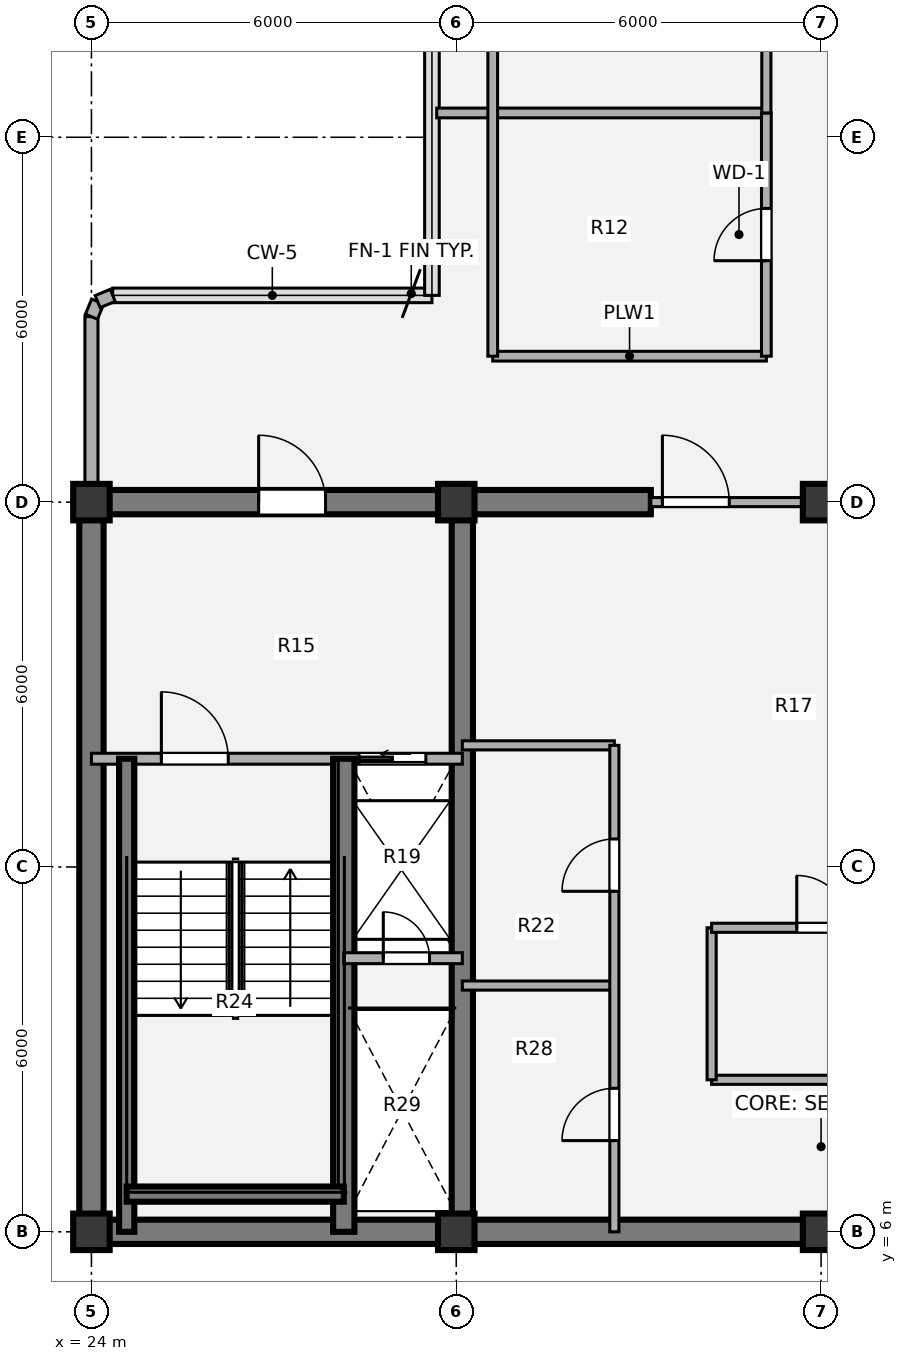
"""IFC4 building model, lengths in metres.
Left out: names, types, materials, properties, quantities, classifications, styles, units other than length and angle.
Written with IfcOpenShell. Run it as: python <this file> out.ifc"""

import sys

from ifc_helpers import new_model, si_unit, direction, frame, frame_2d, origin, origin_2d, place, context, subcontext, project, spatial, rectangle, extrude, source, transform, mapped, element, fill, save


model = new_model("IFC4")
c1 = context("Model", 3, precision=1e-05, world=origin(), true_north=direction((0.0, 1.0)))
c2 = subcontext(c1, "Body", "Model", "MODEL_VIEW")
j1 = project(units=[si_unit("LENGTHUNIT", "METRE"), si_unit("PLANEANGLEUNIT", "RADIAN")], contexts=[c1])
p1 = place(None, origin())
s1 = spatial("IfcSite", under=j1, at=p1, CompositionType="ELEMENT")
p2 = place(p1, origin())
s2 = spatial("IfcBuilding", under=s1, at=p2, CompositionType="ELEMENT")
p3 = place(p2, frame((0.0, 0.0, 283.5)))
s3 = spatial("IfcBuildingStorey", under=s2, at=p3, CompositionType="ELEMENT", Elevation=283.5)
m1 = source(origin(), c2, "Body", "SweptSolid", [
    extrude(rectangle(XDim=0.6, YDim=0.6, at=origin_2d()), origin(), (0.0, 0.0, 1.0), 3.78),
])
for number, where, z_axis, x_axis in (
    (1, (24.0, 6.0, 0.0), (0.0, 0.0, 1.0), (1.0, 0.0, 0.0)),
    (2, (30.0, 6.0, 0.0), (0.0, 0.0, 1.0), (1.0, 0.0, 0.0)),
    (3, (36.0, 6.0, 0.0), (0.0, 0.0, 1.0), (1.0, 0.0, 0.0)),
    (4, (24.0, 18.0, 0.0), (0.0, 0.0, 1.0), (1.0, 0.0, 0.0)),
    (5, (30.0, 18.0, 0.0), (0.0, 0.0, 1.0), (1.0, 0.0, 0.0)),
    (6, (36.0, 18.0, 0.0), (0.0, 0.0, 1.0), (1.0, 0.0, 0.0)),
):
    element("IfcColumn", number, at=place(p3, frame(where, z_axis=z_axis, x_axis=x_axis)), inside=s3, PredefinedType="COLUMN", context=c2, shape_type="MappedRepresentation", body=[
        mapped(m1, transform((0.0, 0.0, 0.0), x_axis=(1.0, 0.0, 0.0), y_axis=(0.0, 1.0, 0.0), z_axis=(0.0, 0.0, 1.0), scale=1.0)),
    ])
p4 = place(p3, frame((48.2, 6.0, 0.0), z_axis=(0.0, 0.0, 1.0), x_axis=(-1.0, 0.0, 0.0)))
e7 = element("IfcWall", 7, at=p4, inside=s3, PredefinedType="SHEAR", context=c2, shape_type="SweptSolid", body=[
    extrude(rectangle(XDim=24.4, YDim=0.4, at=frame_2d((12.2, 0.0))), origin(), (0.0, 0.0, 1.0), 3.78),
])
p5 = place(p3, frame((24.0, 6.0, 0.0), z_axis=(0.0, 0.0, 1.0), x_axis=(0.0, 1.0, 0.0)))
e8 = element("IfcWall", 8, at=p5, inside=s3, PredefinedType="SHEAR", context=c2, shape_type="SweptSolid", body=[
    extrude(rectangle(XDim=12.0, YDim=0.4, at=frame_2d((6.0, 0.0))), origin(), (0.0, 0.0, 1.0), 3.78),
])
p6 = place(p3, frame((23.8, 18.0, 0.0), z_axis=(0.0, 0.0, 1.0), x_axis=(1.0, 0.0, 0.0)))
e9 = element("IfcWall", 9, at=p6, inside=s3, PredefinedType="SHEAR", context=c2, shape_type="SweptSolid", body=[
    extrude(rectangle(XDim=9.4, YDim=0.4, at=frame_2d((4.7, 0.0))), origin(), (0.0, 0.0, 1.0), 3.78),
])
p7 = place(p6, frame((2.95, 0.0, 0.0)))
e10 = element("IfcOpeningElement", 10, at=p7, cuts=e9, PredefinedType="OPENING", context=c2, shape_type="SweptSolid", body=[
    extrude(rectangle(XDim=1.1, YDim=2.1, at=origin_2d()), frame((0.55, 0.21, 1.05), z_axis=(0.0, -1.0, 0.0), x_axis=(1.0, 0.0, 0.0)), (0.0, 0.0, 1.0), 0.42),
])
p8 = place(p3, frame((30.1, 6.0, 0.0), z_axis=(0.0, 0.0, 1.0), x_axis=(0.0, 1.0, 0.0)))
e11 = element("IfcWall", 11, at=p8, inside=s3, PredefinedType="SHEAR", context=c2, shape_type="SweptSolid", body=[
    extrude(rectangle(XDim=12.0, YDim=0.35, at=frame_2d((6.0, 0.0))), origin(), (0.0, 0.0, 1.0), 3.78),
])
p9 = place(p3, frame((24.0, 18.28, 0.0), z_axis=(0.0, 0.0, 1.0), x_axis=(0.0, 1.0, 0.0)))
e12 = element("IfcWall", 12, at=p9, inside=s3, PredefinedType="SOLIDWALL", context=c2, shape_type="SweptSolid", body=[
    extrude(rectangle(XDim=2.77, YDim=0.215, at=frame_2d((1.385, 0.0))), origin(), (0.0, 0.0, 1.0), 2.718),
])
p10 = place(p3, frame((24.0, 21.05, 0.0), z_axis=(0.0, 0.0, 1.0), x_axis=(0.382673670509, 0.923883575944, 0.0)))
e13 = element("IfcWall", 13, at=p10, inside=s3, PredefinedType="SOLIDWALL", context=c2, shape_type="SweptSolid", body=[
    extrude(rectangle(XDim=0.268, YDim=0.215, at=frame_2d((0.134, 0.0))), origin(), (0.0, 0.0, 1.0), 3.53),
])
p11 = place(p3, frame((24.103, 21.298, 0.0), z_axis=(0.0, 0.0, 1.0), x_axis=(0.924205486139, 0.381895560841, 0.0)))
e14 = element("IfcWall", 14, at=p11, inside=s3, PredefinedType="SOLIDWALL", context=c2, shape_type="SweptSolid", body=[
    extrude(rectangle(XDim=0.268, YDim=0.215, at=frame_2d((0.134, 0.0))), origin(), (0.0, 0.0, 1.0), 3.53),
])
p12 = place(p3, frame((30.1, 14.0, 0.0), z_axis=(0.0, 0.0, 1.0), x_axis=(1.0, 0.0, 0.0)))
e15 = element("IfcWall", 15, at=p12, inside=s3, PredefinedType="PARTITIONING", context=c2, shape_type="SweptSolid", body=[
    extrude(rectangle(XDim=2.5, YDim=0.15, at=frame_2d((1.25, 0.0))), origin(), (0.0, 0.0, 1.0), 3.5),
])
p13 = place(p3, frame((34.2, 8.5, 0.0), z_axis=(0.0, 0.0, 1.0), x_axis=(1.0, 0.0, 0.0)))
e16 = element("IfcWall", 16, at=p13, inside=s3, PredefinedType="PARTITIONING", context=c2, shape_type="SweptSolid", body=[
    extrude(rectangle(XDim=3.8, YDim=0.15, at=frame_2d((1.9, 0.0))), origin(), (0.0, 0.0, 1.0), 3.5),
])
p14 = place(p3, frame((34.2, 8.5, 0.0), z_axis=(0.0, 0.0, 1.0), x_axis=(0.0, 1.0, 0.0)))
e17 = element("IfcWall", 17, at=p14, inside=s3, PredefinedType="PARTITIONING", context=c2, shape_type="SweptSolid", body=[
    extrude(rectangle(XDim=2.5, YDim=0.15, at=frame_2d((1.25, 0.0))), origin(), (0.0, 0.0, 1.0), 3.5),
])
p15 = place(p3, frame((34.2, 11.0, 0.0), z_axis=(0.0, 0.0, 1.0), x_axis=(1.0, 0.0, 0.0)))
e18 = element("IfcWall", 18, at=p15, inside=s3, PredefinedType="PARTITIONING", context=c2, shape_type="SweptSolid", body=[
    extrude(rectangle(XDim=3.8, YDim=0.15, at=frame_2d((1.9, 0.0))), origin(), (0.0, 0.0, 1.0), 3.5),
])
p16 = place(p15, frame((1.4, 0.0, 0.0)))
e19 = element("IfcOpeningElement", 19, at=p16, cuts=e18, PredefinedType="OPENING", context=c2, shape_type="SweptSolid", body=[
    extrude(rectangle(XDim=0.86, YDim=2.1, at=origin_2d()), frame((0.43, 0.085, 1.05), z_axis=(0.0, -1.0, 0.0), x_axis=(1.0, 0.0, 0.0)), (0.0, 0.0, 1.0), 0.17),
])
p17 = place(p3, frame((30.1, 10.05, 0.0), z_axis=(0.0, 0.0, 1.0), x_axis=(1.0, 0.0, 0.0)))
e20 = element("IfcWall", 20, at=p17, inside=s3, PredefinedType="PARTITIONING", context=c2, shape_type="SweptSolid", body=[
    extrude(rectangle(XDim=2.5, YDim=0.15, at=frame_2d((1.25, 0.0))), origin(), (0.0, 0.0, 1.0), 3.5),
])
p18 = place(p3, frame((32.6, 6.0, 0.0), z_axis=(0.0, 0.0, 1.0), x_axis=(0.0, 1.0, 0.0)))
e21 = element("IfcWall", 21, at=p18, inside=s3, PredefinedType="PARTITIONING", context=c2, shape_type="SweptSolid", body=[
    extrude(rectangle(XDim=8.0, YDim=0.15, at=frame_2d((4.0, 0.0))), origin(), (0.0, 0.0, 1.0), 3.5),
])
p19 = place(p18, frame((1.5, 0.0, 0.0)))
e22 = element("IfcOpeningElement", 22, at=p19, cuts=e21, PredefinedType="OPENING", context=c2, shape_type="SweptSolid", body=[
    extrude(rectangle(XDim=0.86, YDim=2.1, at=origin_2d()), frame((0.43, 0.085, 1.05), z_axis=(0.0, -1.0, 0.0), x_axis=(1.0, 0.0, 0.0)), (0.0, 0.0, 1.0), 0.17),
])
p20 = place(p18, frame((5.6, 0.0, 0.0)))
e23 = element("IfcOpeningElement", 23, at=p20, cuts=e21, PredefinedType="OPENING", context=c2, shape_type="SweptSolid", body=[
    extrude(rectangle(XDim=0.86, YDim=2.1, at=origin_2d()), frame((0.43, 0.085, 1.05), z_axis=(0.0, -1.0, 0.0), x_axis=(1.0, 0.0, 0.0)), (0.0, 0.0, 1.0), 0.17),
])
p21 = place(p3, frame((33.2, 18.0, 0.0), z_axis=(0.0, 0.0, 1.0), x_axis=(1.0, 0.0, 0.0)))
e24 = element("IfcWall", 24, at=p21, inside=s3, PredefinedType="PARTITIONING", context=c2, shape_type="SweptSolid", body=[
    extrude(rectangle(XDim=5.6, YDim=0.15, at=frame_2d((2.8, 0.0))), origin(), (0.0, 0.0, 1.0), 2.515),
])
p22 = place(p21, frame((0.19, 0.0, 0.0)))
e25 = element("IfcOpeningElement", 25, at=p22, cuts=e24, PredefinedType="OPENING", context=c2, shape_type="SweptSolid", body=[
    extrude(rectangle(XDim=1.1, YDim=2.1, at=origin_2d()), frame((0.55, 0.085, 1.05), z_axis=(0.0, -1.0, 0.0), x_axis=(1.0, 0.0, 0.0)), (0.0, 0.0, 1.0), 0.17),
])
p23 = place(p21, frame((4.31, 0.0, 0.0)))
e26 = element("IfcOpeningElement", 26, at=p23, cuts=e24, PredefinedType="OPENING", context=c2, shape_type="SweptSolid", body=[
    extrude(rectangle(XDim=1.1, YDim=2.1, at=origin_2d()), frame((0.55, 0.085, 1.05), z_axis=(0.0, -1.0, 0.0), x_axis=(1.0, 0.0, 0.0)), (0.0, 0.0, 1.0), 0.17),
])
p24 = place(p3, frame((24.0, 13.78, 0.0), z_axis=(0.0, 0.0, 1.0), x_axis=(1.0, 0.0, 0.0)))
e27 = element("IfcWall", 27, at=p24, inside=s3, PredefinedType="PARTITIONING", context=c2, shape_type="SweptSolid", body=[
    extrude(rectangle(XDim=6.1, YDim=0.18, at=frame_2d((3.05, 0.0))), origin(), (0.0, 0.0, 1.0), 3.5),
])
p25 = place(p24, frame((1.15, 0.0, 0.0)))
e28 = element("IfcOpeningElement", 28, at=p25, cuts=e27, PredefinedType="OPENING", context=c2, shape_type="SweptSolid", body=[
    extrude(rectangle(XDim=1.1, YDim=2.1, at=origin_2d()), frame((0.55, 0.1, 1.05), z_axis=(0.0, -1.0, 0.0), x_axis=(1.0, 0.0, 0.0)), (0.0, 0.0, 1.0), 0.2),
])
p26 = place(p24, frame((4.4, 0.0, 0.0)))
e29 = element("IfcOpeningElement", 29, at=p26, cuts=e27, PredefinedType="OPENING", context=c2, shape_type="SweptSolid", body=[
    extrude(rectangle(XDim=1.1, YDim=2.1, at=origin_2d()), frame((0.55, 0.1, 1.05), z_axis=(0.0, -1.0, 0.0), x_axis=(1.0, 0.0, 0.0)), (0.0, 0.0, 1.0), 0.2),
])
p27 = place(p3, frame((28.15, 6.0, 0.0), z_axis=(0.0, 0.0, 1.0), x_axis=(0.0, 1.0, 0.0)))
e30 = element("IfcWall", 30, at=p27, inside=s3, PredefinedType="SHEAR", context=c2, shape_type="SweptSolid", body=[
    extrude(rectangle(XDim=7.78, YDim=0.35, at=frame_2d((3.89, 0.0))), origin(), (0.0, 0.0, 1.0), 3.85),
])
p28 = place(p3, frame((24.58, 6.0, 0.0), z_axis=(0.0, 0.0, 1.0), x_axis=(0.0, 1.0, 0.0)))
e31 = element("IfcWall", 31, at=p28, inside=s3, PredefinedType="SHEAR", context=c2, shape_type="SweptSolid", body=[
    extrude(rectangle(XDim=7.78, YDim=0.25, at=frame_2d((3.89, 0.0))), origin(), (0.0, 0.0, 1.0), 3.85),
])
p29 = place(p3, frame((24.58, 6.62, 0.0), z_axis=(0.0, 0.0, 1.0), x_axis=(1.0, 0.0, 0.0)))
e32 = element("IfcWall", 32, at=p29, inside=s3, PredefinedType="SHEAR", context=c2, shape_type="SweptSolid", body=[
    extrude(rectangle(XDim=3.57, YDim=0.25, at=frame_2d((1.785, 0.0))), origin(), (0.0, 0.0, 1.0), 3.85),
])
p30 = place(p3, frame((28.15, 10.5, 0.0), z_axis=(0.0, 0.0, 1.0), x_axis=(1.0, 0.0, 0.0)))
e33 = element("IfcWall", 33, at=p30, inside=s3, PredefinedType="PARTITIONING", context=c2, shape_type="SweptSolid", body=[
    extrude(rectangle(XDim=1.95, YDim=0.18, at=frame_2d((0.975, 0.0))), origin(), (0.0, 0.0, 1.0), 3.5),
])
p31 = place(p30, frame((0.65, 0.0, 0.0)))
e34 = element("IfcOpeningElement", 34, at=p31, cuts=e33, PredefinedType="OPENING", context=c2, shape_type="SweptSolid", body=[
    extrude(rectangle(XDim=0.76, YDim=2.05, at=origin_2d()), frame((0.38, 0.1, 1.025), z_axis=(0.0, -1.0, 0.0), x_axis=(1.0, 0.0, 0.0)), (0.0, 0.0, 1.0), 0.2),
])
p32 = place(p3, frame((30.6, 20.4, 0.0), z_axis=(0.0, 0.0, 1.0), x_axis=(1.0, 0.0, 0.0)))
e35 = element("IfcWall", 35, at=p32, inside=s3, PredefinedType="PLUMBINGWALL", context=c2, shape_type="SweptSolid", body=[
    extrude(rectangle(XDim=4.5, YDim=0.16, at=frame_2d((2.25, 0.0))), origin(), (0.0, 0.0, 1.0), 3.5),
])
p33 = place(p3, frame((29.679, 24.4, 0.0), z_axis=(0.0, 0.0, 1.0), x_axis=(1.0, 0.0, 0.0)))
e36 = element("IfcWall", 36, at=p33, inside=s3, PredefinedType="PLUMBINGWALL", context=c2, shape_type="SweptSolid", body=[
    extrude(rectangle(XDim=5.421, YDim=0.16, at=frame_2d((2.711, 0.0))), origin(), (0.0, 0.0, 1.0), 3.5),
])
p34 = place(p3, frame((30.6, 20.4, 0.0), z_axis=(0.0, 0.0, 1.0), x_axis=(0.0, 1.0, 0.0)))
e37 = element("IfcWall", 37, at=p34, inside=s3, PredefinedType="PLUMBINGWALL", context=c2, shape_type="SweptSolid", body=[
    extrude(rectangle(XDim=6.5, YDim=0.16, at=frame_2d((3.25, 0.0))), origin(), (0.0, 0.0, 1.0), 2.815),
])
p35 = place(p3, frame((35.1, 20.4, 0.0), z_axis=(0.0, 0.0, 1.0), x_axis=(0.0, 1.0, 0.0)))
e38 = element("IfcWall", 38, at=p35, inside=s3, PredefinedType="PLUMBINGWALL", context=c2, shape_type="SweptSolid", body=[
    extrude(rectangle(XDim=4.0, YDim=0.16, at=frame_2d((2.0, 0.0))), origin(), (0.0, 0.0, 1.0), 3.5),
])
p36 = place(p35, frame((1.57, 0.0, 0.0)))
e39 = element("IfcOpeningElement", 39, at=p36, cuts=e38, PredefinedType="OPENING", context=c2, shape_type="SweptSolid", body=[
    extrude(rectangle(XDim=0.86, YDim=2.1, at=origin_2d()), frame((0.43, 0.09, 1.05), z_axis=(0.0, -1.0, 0.0), x_axis=(1.0, 0.0, 0.0)), (0.0, 0.0, 1.0), 0.18),
])
p37 = place(p3, frame((35.1, 24.4, 0.0), z_axis=(0.0, 0.0, 1.0), x_axis=(0.0, 1.0, 0.0)))
e40 = element("IfcWall", 40, at=p37, inside=s3, PredefinedType="PARTITIONING", context=c2, shape_type="SweptSolid", body=[
    extrude(rectangle(XDim=17.2, YDim=0.15, at=frame_2d((8.6, 0.0))), origin(), (0.0, 0.0, 1.0), 3.5),
])
p38 = place(p37, frame((5.075, 0.0, 0.0)))
e41 = element("IfcOpeningElement", 41, at=p38, cuts=e40, PredefinedType="OPENING", context=c2, shape_type="SweptSolid", body=[
    extrude(rectangle(XDim=1.05, YDim=2.1, at=origin_2d()), frame((0.525, 0.085, 1.05), z_axis=(0.0, -1.0, 0.0), x_axis=(1.0, 0.0, 0.0)), (0.0, 0.0, 1.0), 0.17),
])
m2 = source(origin(), c2, "Body", "SweptSolid", [
    extrude(rectangle(XDim=0.86, YDim=2.1, at=origin_2d()), frame((0.43, 0.025, 1.05), z_axis=(0.0, -1.0, 0.0), x_axis=(1.0, 0.0, 0.0)), (0.0, 0.0, 1.0), 0.05),
])
p39 = place(p16, origin())
e42 = element("IfcDoor", 42, at=p39, inside=s3, OperationType="SINGLE_SWING_LEFT", PredefinedType="DOOR", context=c2, shape_type="MappedRepresentation", body=[
    mapped(m2, transform((0.0, 0.0, 0.0), x_axis=(1.0, 0.0, 0.0), y_axis=(0.0, 1.0, 0.0), z_axis=(0.0, 0.0, 1.0), scale=1.0)),
])
fill(e19, e42)
p40 = place(p19, origin())
e43 = element("IfcDoor", 43, at=p40, inside=s3, OperationType="SINGLE_SWING_LEFT", PredefinedType="DOOR", context=c2, shape_type="MappedRepresentation", body=[
    mapped(m2, transform((0.0, 0.0, 0.0), x_axis=(1.0, 0.0, 0.0), y_axis=(0.0, 1.0, 0.0), z_axis=(0.0, 0.0, 1.0), scale=1.0)),
])
fill(e22, e43)
p41 = place(p20, origin())
e44 = element("IfcDoor", 44, at=p41, inside=s3, OperationType="SINGLE_SWING_LEFT", PredefinedType="DOOR", context=c2, shape_type="MappedRepresentation", body=[
    mapped(m2, transform((0.0, 0.0, 0.0), x_axis=(1.0, 0.0, 0.0), y_axis=(0.0, 1.0, 0.0), z_axis=(0.0, 0.0, 1.0), scale=1.0)),
])
fill(e23, e44)
m3 = source(origin(), c2, "Body", "SweptSolid", [
    extrude(rectangle(XDim=1.1, YDim=2.1, at=origin_2d()), frame((0.55, 0.025, 1.05), z_axis=(0.0, -1.0, 0.0), x_axis=(1.0, 0.0, 0.0)), (0.0, 0.0, 1.0), 0.05),
])
p42 = place(p22, origin())
e45 = element("IfcDoor", 45, at=p42, inside=s3, OperationType="SINGLE_SWING_LEFT", PredefinedType="DOOR", context=c2, shape_type="MappedRepresentation", body=[
    mapped(m3, transform((0.0, 0.0, 0.0), x_axis=(1.0, 0.0, 0.0), y_axis=(0.0, 1.0, 0.0), z_axis=(0.0, 0.0, 1.0), scale=1.0)),
])
fill(e25, e45)
m4 = source(origin(), c2, "Body", "SweptSolid", [
    extrude(rectangle(XDim=1.1, YDim=2.1, at=origin_2d()), frame((0.55, 0.025, 1.05), z_axis=(0.0, -1.0, 0.0), x_axis=(1.0, 0.0, 0.0)), (0.0, 0.0, 1.0), 0.05),
])
p43 = place(p25, origin())
e46 = element("IfcDoor", 46, at=p43, inside=s3, OperationType="SINGLE_SWING_LEFT", PredefinedType="DOOR", context=c2, shape_type="MappedRepresentation", body=[
    mapped(m4, transform((0.0, 0.0, 0.0), x_axis=(1.0, 0.0, 0.0), y_axis=(0.0, 1.0, 0.0), z_axis=(0.0, 0.0, 1.0), scale=1.0)),
])
fill(e28, e46)
m5 = source(origin(), c2, "Body", "SweptSolid", [
    extrude(rectangle(XDim=1.1, YDim=2.1, at=origin_2d()), frame((0.55, 0.025, 1.05), z_axis=(0.0, -1.0, 0.0), x_axis=(1.0, 0.0, 0.0)), (0.0, 0.0, 1.0), 0.05),
])
p44 = place(p26, origin())
e47 = element("IfcDoor", 47, at=p44, inside=s3, OperationType="SLIDING_TO_LEFT", PredefinedType="DOOR", context=c2, shape_type="MappedRepresentation", body=[
    mapped(m5, transform((0.0, 0.0, 0.0), x_axis=(1.0, 0.0, 0.0), y_axis=(0.0, 1.0, 0.0), z_axis=(0.0, 0.0, 1.0), scale=1.0)),
])
fill(e29, e47)
m6 = source(origin(), c2, "Body", "SweptSolid", [
    extrude(rectangle(XDim=0.76, YDim=2.05, at=origin_2d()), frame((0.38, 0.025, 1.025), z_axis=(0.0, -1.0, 0.0), x_axis=(1.0, 0.0, 0.0)), (0.0, 0.0, 1.0), 0.05),
])
p45 = place(p31, origin())
e48 = element("IfcDoor", 48, at=p45, inside=s3, OperationType="SINGLE_SWING_LEFT", PredefinedType="DOOR", context=c2, shape_type="MappedRepresentation", body=[
    mapped(m6, transform((0.0, 0.0, 0.0), x_axis=(1.0, 0.0, 0.0), y_axis=(0.0, 1.0, 0.0), z_axis=(0.0, 0.0, 1.0), scale=1.0)),
])
fill(e34, e48)
p46 = place(p7, origin())
e49 = element("IfcDoor", 49, at=p46, inside=s3, OperationType="SINGLE_SWING_LEFT", PredefinedType="DOOR", context=c2, shape_type="MappedRepresentation", body=[
    mapped(m3, transform((0.0, 0.0, 0.0), x_axis=(1.0, 0.0, 0.0), y_axis=(0.0, 1.0, 0.0), z_axis=(0.0, 0.0, 1.0), scale=1.0)),
])
fill(e10, e49)
m7 = source(origin(), c2, "Body", "SweptSolid", [
    extrude(rectangle(XDim=0.86, YDim=2.1, at=origin_2d()), frame((0.43, 0.025, 1.05), z_axis=(0.0, -1.0, 0.0), x_axis=(1.0, 0.0, 0.0)), (0.0, 0.0, 1.0), 0.05),
])
p47 = place(p36, origin())
e50 = element("IfcDoor", 50, at=p47, inside=s3, OperationType="SINGLE_SWING_LEFT", PredefinedType="DOOR", context=c2, shape_type="MappedRepresentation", body=[
    mapped(m7, transform((0.0, 0.0, 0.0), x_axis=(1.0, 0.0, 0.0), y_axis=(0.0, 1.0, 0.0), z_axis=(0.0, 0.0, 1.0), scale=1.0)),
])
fill(e39, e50)
save(model, sys.argv[1])
